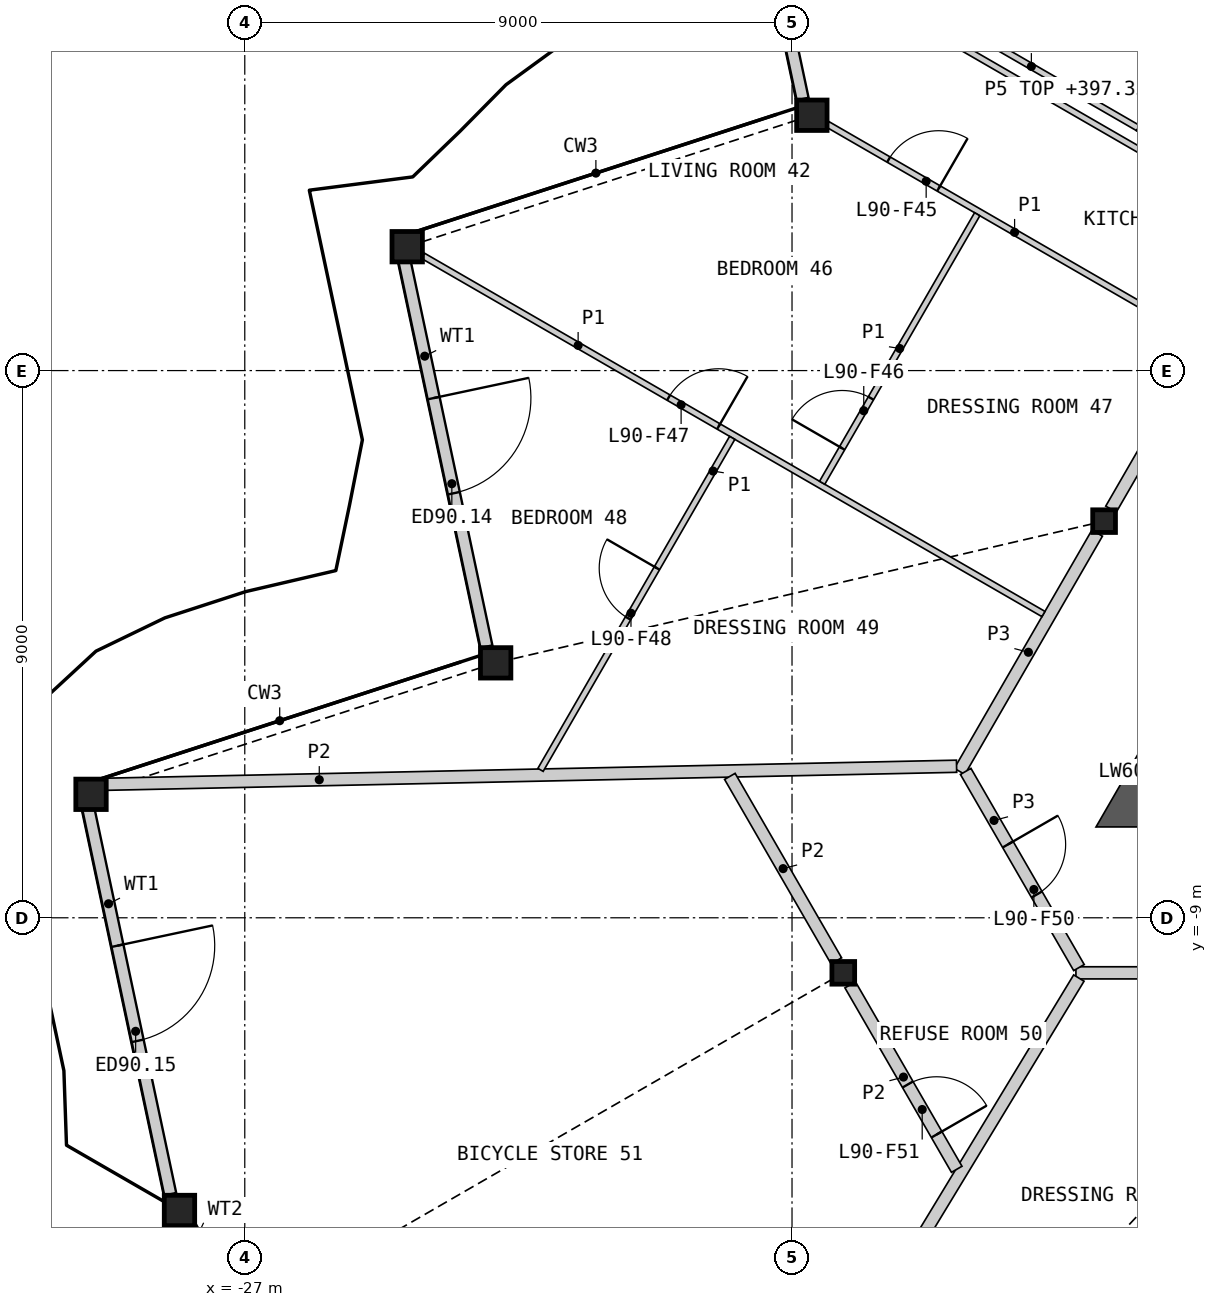
"""IFC4 building model, lengths in metres.
Left out: names, types, materials, properties, quantities, classifications, styles, units other than length and angle.
Written with IfcOpenShell. Run it as: python <this file> out.ifc"""

import sys

from ifc_helpers import new_model, si_unit, direction, frame, frame_2d, origin, origin_2d, place, context, subcontext, project, spatial, polyline, rectangle, hollow_rectangle, i_section, outline, extrude, element, fill, save


model = new_model("IFC4")
c1 = context("Model", 3, precision=1e-05, world=origin(), true_north=direction((0.0, 1.0)))
c2 = subcontext(c1, "Body", "Model", "MODEL_VIEW")
j1 = project(units=[si_unit("LENGTHUNIT", "METRE"), si_unit("PLANEANGLEUNIT", "RADIAN")], contexts=[c1])
p1 = place(None, origin())
s1 = spatial("IfcSite", under=j1, at=p1, CompositionType="ELEMENT")
p2 = place(p1, origin())
s2 = spatial("IfcBuilding", under=s1, at=p2, CompositionType="ELEMENT")
p3 = place(p2, frame((0.0, 0.0, 395.0)))
s3 = spatial("IfcBuildingStorey", under=s2, at=p3, CompositionType="ELEMENT", Elevation=395.0)
for number, where, z_axis, x_axis in (
    (1, (-17.674, 4.199, 0.0), (0.0, 0.0, 1.0), (1.0, 0.0, 0.0)),
    (2, (-24.329, 2.037, 0.0), (0.0, 0.0, 1.0), (1.0, 0.0, 0.0)),
    (3, (-22.874, -4.807, 0.0), (0.0, 0.0, 1.0), (1.0, 0.0, 0.0)),
    (4, (-29.529, -6.969, 0.0), (0.0, 0.0, 1.0), (1.0, 0.0, 0.0)),
    (5, (-28.074, -13.814, 0.0), (0.0, 0.0, 1.0), (1.0, 0.0, 0.0)),
):
    element("IfcColumn", number, at=place(p3, frame(where, z_axis=z_axis, x_axis=x_axis)), inside=s3, PredefinedType="COLUMN", context=c2, shape_type="SweptSolid", body=[
        extrude(hollow_rectangle(XDim=0.5, YDim=0.5, WallThickness=0.03, at=origin_2d()), origin(), (0.0, 0.0, 1.0), 3.4),
    ])
for number, where, z_axis, x_axis in (
    (6, (-12.868, -2.476, 0.0), (0.0, 0.0, 1.0), (1.0, 0.0, 0.0)),
    (7, (-17.157, -9.906, 0.0), (0.0, 0.0, 1.0), (1.0, 0.0, 0.0)),
):
    element("IfcColumn", number, at=place(p3, frame(where, z_axis=z_axis, x_axis=x_axis)), inside=s3, PredefinedType="COLUMN", context=c2, shape_type="SweptSolid", body=[
        extrude(i_section(OverallWidth=0.374, OverallDepth=0.372, WebThickness=0.016, FlangeThickness=0.026, at=origin_2d()), origin(), (0.0, 0.0, 1.0), 3.4),
    ])
p4 = place(p3, frame((-19.179, 10.836, 0.0), z_axis=(0.0, 0.0, 1.0), x_axis=(0.207910765171, -0.978147797486, 0.0)))
e8 = element("IfcWall", 8, at=p4, inside=s3, PredefinedType="SOLIDWALL", context=c2, shape_type="SweptSolid", body=[
    extrude(rectangle(XDim=6.512, YDim=0.2, at=frame_2d((3.256, 0.0))), origin(), (0.0, 0.0, 1.0), 2.634),
])
p5 = place(p4, frame((2.333, 0.0, 0.0)))
e9 = element("IfcOpeningElement", 9, at=p5, cuts=e8, PredefinedType="OPENING", context=c2, shape_type="SweptSolid", body=[
    extrude(rectangle(XDim=1.6, YDim=2.25, at=frame_2d((0.8, 1.125))), frame((0.0, 0.11, 0.0), z_axis=(0.0, -1.0, 0.0), x_axis=(1.0, 0.0, 0.0)), (0.0, 0.0, 1.0), 0.22),
])
p6 = place(p3, frame((-24.379, 1.83, 0.0), z_axis=(0.0, 0.0, 1.0), x_axis=(0.207910765171, -0.978147797486, 0.0)))
e10 = element("IfcWall", 10, at=p6, inside=s3, PredefinedType="SOLIDWALL", context=c2, shape_type="SweptSolid", body=[
    extrude(rectangle(XDim=6.512, YDim=0.2, at=frame_2d((3.256, 0.0))), origin(), (0.0, 0.0, 1.0), 2.634),
])
p7 = place(p6, frame((2.333, 0.0, 0.0)))
e11 = element("IfcOpeningElement", 11, at=p7, cuts=e10, PredefinedType="OPENING", context=c2, shape_type="SweptSolid", body=[
    extrude(rectangle(XDim=1.6, YDim=2.25, at=frame_2d((0.8, 1.125))), frame((0.0, 0.11, 0.0), z_axis=(0.0, -1.0, 0.0), x_axis=(1.0, 0.0, 0.0)), (0.0, 0.0, 1.0), 0.22),
])
p8 = place(p3, frame((-29.579, -7.177, 0.0), z_axis=(0.0, 0.0, 1.0), x_axis=(0.207910765171, -0.978147797486, 0.0)))
e12 = element("IfcWall", 12, at=p8, inside=s3, PredefinedType="SOLIDWALL", context=c2, shape_type="SweptSolid", body=[
    extrude(rectangle(XDim=6.512, YDim=0.2, at=frame_2d((3.256, 0.0))), origin(), (0.0, 0.0, 1.0), 2.634),
])
p9 = place(p8, frame((2.333, 0.0, 0.0)))
e13 = element("IfcOpeningElement", 13, at=p9, cuts=e12, PredefinedType="OPENING", context=c2, shape_type="SweptSolid", body=[
    extrude(rectangle(XDim=1.6, YDim=2.25, at=frame_2d((0.8, 1.125))), frame((0.0, 0.11, 0.0), z_axis=(0.0, -1.0, 0.0), x_axis=(1.0, 0.0, 0.0)), (0.0, 0.0, 1.0), 0.22),
])
p10 = place(p3, frame((-28.007, -13.939, 0.0), z_axis=(0.0, 0.0, 1.0), x_axis=(0.499967189098, -0.866044346339, 0.0)))
e14 = element("IfcWall", 14, at=p10, inside=s3, PredefinedType="SOLIDWALL", context=c2, shape_type="SweptSolid", body=[
    extrude(rectangle(XDim=1.612, YDim=0.25, at=frame_2d((0.806, 0.0))), origin(), (0.0, 0.0, 1.0), 2.634),
])
p11 = place(p10, frame((0.25, 0.0, 0.4)))
e15 = element("IfcOpeningElement", 15, at=p11, cuts=e14, PredefinedType="OPENING", context=c2, shape_type="SweptSolid", body=[
    extrude(rectangle(XDim=0.6, YDim=0.6, at=frame_2d((0.3, 0.3))), frame((0.0, 0.135, 0.0), z_axis=(0.0, -1.0, 0.0), x_axis=(1.0, 0.0, 0.0)), (0.0, 0.0, 1.0), 0.27),
])
p12 = place(p3, origin())
e16 = element("IfcWall", 16, at=p12, inside=s3, PredefinedType="SHEAR", context=c2, shape_type="SweptSolid", body=[
    extrude(outline(polyline([(-12.48, -6.606), (-11.961, -6.906), (-11.961, -7.506), (-13.0, -7.506), (-12.48, -6.606)])), origin(), (0.0, 0.0, 1.0), 3.1),
])
p13 = place(p3, frame((-10.925, -4.511, 0.0), z_axis=(0.0, 0.0, 1.0), x_axis=(-0.500018667571, -0.866014625789, 0.0)))
e17 = element("IfcWall", 17, at=p13, inside=s3, PredefinedType="SHEAR", context=c2, shape_type="SweptSolid", body=[
    extrude(rectangle(XDim=2.592, YDim=0.6, at=frame_2d((1.296, 0.0))), origin(), (0.0, 0.0, 1.0), 3.1),
])
p14 = place(p13, frame((0.6, 0.0, 0.0)))
e18 = element("IfcOpeningElement", 18, at=p14, cuts=e17, PredefinedType="OPENING", context=c2, shape_type="SweptSolid", body=[
    extrude(rectangle(XDim=1.0, YDim=2.1, at=frame_2d((0.5, 1.05))), frame((0.0, 0.31, 0.0), z_axis=(0.0, -1.0, 0.0), x_axis=(1.0, 0.0, 0.0)), (0.0, 0.0, 1.0), 0.62),
])
p15 = place(p3, frame((-12.754, -2.279, 0.0), z_axis=(0.0, 0.0, 1.0), x_axis=(0.500001682468, 0.866024432409, 0.0)))
e19 = element("IfcWall", 19, at=p15, inside=s3, PredefinedType="PARTITIONING", context=c2, shape_type="SweptSolid", body=[
    extrude(rectangle(XDim=8.124, YDim=0.2, at=frame_2d((4.062, 0.0))), origin(), (0.0, 0.0, 1.0), 3.1),
])
p16 = place(p15, frame((3.762, 0.0, 0.0)))
e20 = element("IfcOpeningElement", 20, at=p16, cuts=e19, PredefinedType="OPENING", context=c2, shape_type="SweptSolid", body=[
    extrude(rectangle(XDim=1.0, YDim=2.1, at=frame_2d((0.5, 1.05))), frame((0.0, 0.11, 0.0), z_axis=(0.0, -1.0, 0.0), x_axis=(1.0, 0.0, 0.0)), (0.0, 0.0, 1.0), 0.22),
])
p17 = place(p3, frame((-13.331, -9.906, 0.0), z_axis=(0.0, 0.0, 1.0), x_axis=(1.0, 0.0, 0.0)))
e21 = element("IfcWall", 21, at=p17, inside=s3, PredefinedType="PARTITIONING", context=c2, shape_type="SweptSolid", body=[
    extrude(rectangle(XDim=4.555, YDim=0.2, at=frame_2d((2.278, 0.0))), origin(), (0.0, 0.0, 1.0), 3.1),
])
p18 = place(p3, frame((-15.244, -6.592, 0.0), z_axis=(0.0, 0.0, 1.0), x_axis=(0.499974648164, 0.866040040179, 0.0)))
e22 = element("IfcWall", 22, at=p18, inside=s3, PredefinedType="PARTITIONING", context=c2, shape_type="SweptSolid", body=[
    extrude(rectangle(XDim=4.525, YDim=0.2, at=frame_2d((2.263, 0.0))), origin(), (0.0, 0.0, 1.0), 3.1),
])
p19 = place(p3, frame((-15.144, -6.592, 0.0), z_axis=(0.0, 0.0, 1.0), x_axis=(0.499958791762, -0.866049194065, 0.0)))
e23 = element("IfcWall", 23, at=p19, inside=s3, PredefinedType="PARTITIONING", context=c2, shape_type="SweptSolid", body=[
    extrude(rectangle(XDim=3.726, YDim=0.2, at=frame_2d((1.863, 0.0))), origin(), (0.0, 0.0, 1.0), 3.1),
])
p20 = place(p19, frame((1.388, 0.0, 0.0)))
e24 = element("IfcOpeningElement", 24, at=p20, cuts=e23, PredefinedType="OPENING", context=c2, shape_type="SweptSolid", body=[
    extrude(rectangle(XDim=0.95, YDim=2.1, at=frame_2d((0.475, 1.05))), frame((0.0, 0.11, 0.0), z_axis=(0.0, -1.0, 0.0), x_axis=(1.0, 0.0, 0.0)), (0.0, 0.0, 1.0), 0.22),
])
p21 = place(p3, frame((-20.354, -21.66, 0.0), z_axis=(0.0, 0.0, 1.0), x_axis=(0.518240642668, 0.85523484277, 0.0)))
e25 = element("IfcWall", 25, at=p21, inside=s3, PredefinedType="PARTITIONING", context=c2, shape_type="SweptSolid", body=[
    extrude(rectangle(XDim=13.644, YDim=0.2, at=frame_2d((6.822, 0.0))), origin(), (0.0, 0.0, 1.0), 2.33),
])
p22 = place(p3, frame((-29.269, -6.804, 0.0), z_axis=(0.0, 0.0, 1.0), x_axis=(0.999775536303, 0.021186717777, 0.0)))
e26 = element("IfcWall", 26, at=p22, inside=s3, PredefinedType="PARTITIONING", context=c2, shape_type="SweptSolid", body=[
    extrude(rectangle(XDim=13.978, YDim=0.2, at=frame_2d((6.989, 0.0))), origin(), (0.0, 0.0, 1.0), 2.33),
])
p23 = place(p3, frame((-17.043, -10.103, 0.0), z_axis=(0.0, 0.0, 1.0), x_axis=(0.500005931509, -0.866021979199, 0.0)))
e27 = element("IfcWall", 27, at=p23, inside=s3, PredefinedType="PARTITIONING", context=c2, shape_type="SweptSolid", body=[
    extrude(rectangle(XDim=3.504, YDim=0.2, at=frame_2d((1.752, 0.0))), origin(), (0.0, 0.0, 1.0), 2.33),
])
p24 = place(p23, frame((1.893, 0.0, 0.0)))
e28 = element("IfcOpeningElement", 28, at=p24, cuts=e27, PredefinedType="OPENING", context=c2, shape_type="SweptSolid", body=[
    extrude(rectangle(XDim=0.95, YDim=2.1, at=frame_2d((0.475, 1.05))), frame((0.0, 0.11, 0.0), z_axis=(0.0, -1.0, 0.0), x_axis=(1.0, 0.0, 0.0)), (0.0, 0.0, 1.0), 0.22),
])
p25 = place(p3, frame((-19.022, -6.674, 0.0), z_axis=(0.0, 0.0, 1.0), x_axis=(0.499983843005, -0.866034731829, 0.0)))
e29 = element("IfcWall", 29, at=p25, inside=s3, PredefinedType="PARTITIONING", context=c2, shape_type="SweptSolid", body=[
    extrude(rectangle(XDim=3.503, YDim=0.2, at=frame_2d((1.752, 0.0))), origin(), (0.0, 0.0, 1.0), 2.33),
])
p26 = place(p3, frame((-24.069, 1.887, 0.0), z_axis=(0.0, 0.0, 1.0), x_axis=(0.866023404247, -0.500003463284, 0.0)))
e30 = element("IfcWall", 30, at=p26, inside=s3, PredefinedType="PARTITIONING", context=c2, shape_type="SweptSolid", body=[
    extrude(rectangle(XDim=11.782, YDim=0.1, at=frame_2d((5.891, 0.0))), origin(), (0.0, 0.0, 1.0), 2.33),
])
p27 = place(p26, frame((4.664, 0.0, 0.0)))
e31 = element("IfcOpeningElement", 31, at=p27, cuts=e30, PredefinedType="OPENING", context=c2, shape_type="SweptSolid", body=[
    extrude(rectangle(XDim=0.95, YDim=2.1, at=frame_2d((0.475, 1.05))), frame((0.0, 0.06, 0.0), z_axis=(0.0, -1.0, 0.0), x_axis=(1.0, 0.0, 0.0)), (0.0, 0.0, 1.0), 0.12),
])
p28 = place(p3, frame((-17.414, 4.049, 0.0), z_axis=(0.0, 0.0, 1.0), x_axis=(0.866033839264, -0.499985389037, 0.0)))
e32 = element("IfcWall", 32, at=p28, inside=s3, PredefinedType="PARTITIONING", context=c2, shape_type="SweptSolid", body=[
    extrude(rectangle(XDim=7.1, YDim=0.1, at=frame_2d((3.55, 0.0))), origin(), (0.0, 0.0, 1.0), 2.33),
])
p29 = place(p28, frame((1.158, 0.0, 0.0)))
e33 = element("IfcOpeningElement", 33, at=p29, cuts=e32, PredefinedType="OPENING", context=c2, shape_type="SweptSolid", body=[
    extrude(rectangle(XDim=0.95, YDim=2.1, at=frame_2d((0.475, 1.05))), frame((0.0, 0.06, 0.0), z_axis=(0.0, -1.0, 0.0), x_axis=(1.0, 0.0, 0.0)), (0.0, 0.0, 1.0), 0.12),
])
p30 = place(p3, frame((-22.136, -6.567, 0.0), z_axis=(0.0, 0.0, 1.0), x_axis=(0.500016298831, 0.866015993445, 0.0)))
e34 = element("IfcWall", 34, at=p30, inside=s3, PredefinedType="PARTITIONING", context=c2, shape_type="SweptSolid", body=[
    extrude(rectangle(XDim=6.305, YDim=0.1, at=frame_2d((3.152, 0.0))), origin(), (0.0, 0.0, 1.0), 2.33),
])
p31 = place(p30, frame((2.88, 0.0, 0.0)))
e35 = element("IfcOpeningElement", 35, at=p31, cuts=e34, PredefinedType="OPENING", context=c2, shape_type="SweptSolid", body=[
    extrude(rectangle(XDim=0.95, YDim=2.1, at=frame_2d((0.475, 1.05))), frame((0.0, 0.06, 0.0), z_axis=(0.0, -1.0, 0.0), x_axis=(1.0, 0.0, 0.0)), (0.0, 0.0, 1.0), 0.12),
])
p32 = place(p3, frame((-15.318, 5.38, 0.0), z_axis=(0.0, 0.0, 1.0), x_axis=(0.866035260786, -0.499982926783, 0.0)))
e36 = element("IfcWall", 36, at=p32, inside=s3, PredefinedType="PARTITIONING", context=c2, shape_type="SweptSolid", body=[
    extrude(rectangle(XDim=5.95, YDim=0.1, at=frame_2d((2.975, 0.0))), origin(), (0.0, 0.0, 1.0), 2.33),
])
p33 = place(p3, frame((-12.292, 3.921, 0.0), z_axis=(0.0, 0.0, 1.0), x_axis=(0.499996545922, 0.866027397988, 0.0)))
e37 = element("IfcWall", 37, at=p33, inside=s3, PredefinedType="PARTITIONING", context=c2, shape_type="SweptSolid", body=[
    extrude(rectangle(XDim=5.5, YDim=0.1, at=frame_2d((2.75, 0.0))), origin(), (0.0, 0.0, 1.0), 2.33),
])
p34 = place(p33, frame((4.3, 0.0, 0.0)))
e38 = element("IfcOpeningElement", 38, at=p34, cuts=e37, PredefinedType="OPENING", context=c2, shape_type="SweptSolid", body=[
    extrude(rectangle(XDim=0.95, YDim=2.1, at=frame_2d((0.475, 1.05))), frame((0.0, 0.06, 0.0), z_axis=(0.0, -1.0, 0.0), x_axis=(1.0, 0.0, 0.0)), (0.0, 0.0, 1.0), 0.12),
])
p35 = place(p33, frame((1.465, 0.0, 0.0)))
e39 = element("IfcOpeningElement", 39, at=p35, cuts=e37, PredefinedType="OPENING", context=c2, shape_type="SweptSolid", body=[
    extrude(rectangle(XDim=0.95, YDim=2.1, at=frame_2d((0.475, 1.05))), frame((0.0, 0.06, 0.0), z_axis=(0.0, -1.0, 0.0), x_axis=(1.0, 0.0, 0.0)), (0.0, 0.0, 1.0), 0.12),
])
p36 = place(p3, frame((-17.504, -1.845, 0.0), z_axis=(0.0, 0.0, 1.0), x_axis=(0.499984882974, 0.866034131428, 0.0)))
e40 = element("IfcWall", 40, at=p36, inside=s3, PredefinedType="PARTITIONING", context=c2, shape_type="SweptSolid", body=[
    extrude(rectangle(XDim=5.1, YDim=0.1, at=frame_2d((2.55, 0.0))), origin(), (0.0, 0.0, 1.0), 2.33),
])
p37 = place(p36, frame((0.656, 0.0, 0.0)))
e41 = element("IfcOpeningElement", 41, at=p37, cuts=e40, PredefinedType="OPENING", context=c2, shape_type="SweptSolid", body=[
    extrude(rectangle(XDim=0.95, YDim=2.1, at=frame_2d((0.475, 1.05))), frame((0.0, 0.06, 0.0), z_axis=(0.0, -1.0, 0.0), x_axis=(1.0, 0.0, 0.0)), (0.0, 0.0, 1.0), 0.12),
])
p38 = place(p3, frame((-14.648, 5.34, 0.0), z_axis=(0.0, 0.0, 1.0), x_axis=(0.86599734893, -0.500048589285, 0.0)))
e42 = element("IfcWall", 42, at=p38, inside=s3, PredefinedType="PARTITIONING", context=c2, shape_type="SweptSolid", body=[
    extrude(rectangle(XDim=2.7, YDim=0.1, at=frame_2d((1.35, 0.0))), origin(), (0.0, 0.0, 1.0), 2.33),
])
p39 = place(p7, origin())
e43 = element("IfcDoor", 43, at=p39, inside=s3, OperationType="DOUBLE_DOOR_SINGLE_SWING", PredefinedType="DOOR", context=c2, shape_type="SweptSolid", body=[
    extrude(rectangle(XDim=1.6, YDim=2.25, at=frame_2d((0.8, 1.125))), frame((0.0, 0.025, 0.0), z_axis=(0.0, -1.0, 0.0), x_axis=(1.0, 0.0, 0.0)), (0.0, 0.0, 1.0), 0.05),
])
fill(e11, e43)
p40 = place(p9, origin())
e44 = element("IfcDoor", 44, at=p40, inside=s3, OperationType="DOUBLE_DOOR_SINGLE_SWING", PredefinedType="DOOR", context=c2, shape_type="SweptSolid", body=[
    extrude(rectangle(XDim=1.6, YDim=2.25, at=frame_2d((0.8, 1.125))), frame((0.0, 0.025, 0.0), z_axis=(0.0, -1.0, 0.0), x_axis=(1.0, 0.0, 0.0)), (0.0, 0.0, 1.0), 0.05),
])
fill(e13, e44)
p41 = place(p29, origin())
e45 = element("IfcDoor", 45, at=p41, inside=s3, OperationType="SINGLE_SWING_RIGHT", PredefinedType="DOOR", context=c2, shape_type="SweptSolid", body=[
    extrude(rectangle(XDim=0.95, YDim=2.1, at=frame_2d((0.475, 1.05))), frame((0.0, 0.025, 0.0), z_axis=(0.0, -1.0, 0.0), x_axis=(1.0, 0.0, 0.0)), (0.0, 0.0, 1.0), 0.05),
])
fill(e33, e45)
p42 = place(p37, origin())
e46 = element("IfcDoor", 46, at=p42, inside=s3, OperationType="SINGLE_SWING_LEFT", PredefinedType="DOOR", context=c2, shape_type="SweptSolid", body=[
    extrude(rectangle(XDim=0.95, YDim=2.1, at=frame_2d((0.475, 1.05))), frame((0.0, 0.025, 0.0), z_axis=(0.0, -1.0, 0.0), x_axis=(1.0, 0.0, 0.0)), (0.0, 0.0, 1.0), 0.05),
])
fill(e41, e46)
p43 = place(p27, origin())
e47 = element("IfcDoor", 47, at=p43, inside=s3, OperationType="SINGLE_SWING_RIGHT", PredefinedType="DOOR", context=c2, shape_type="SweptSolid", body=[
    extrude(rectangle(XDim=0.95, YDim=2.1, at=frame_2d((0.475, 1.05))), frame((0.0, 0.025, 0.0), z_axis=(0.0, -1.0, 0.0), x_axis=(1.0, 0.0, 0.0)), (0.0, 0.0, 1.0), 0.05),
])
fill(e31, e47)
p44 = place(p31, origin())
e48 = element("IfcDoor", 48, at=p44, inside=s3, OperationType="SINGLE_SWING_RIGHT", PredefinedType="DOOR", context=c2, shape_type="SweptSolid", body=[
    extrude(rectangle(XDim=0.95, YDim=2.1, at=frame_2d((0.475, 1.05))), frame((0.0, 0.025, 0.0), z_axis=(0.0, -1.0, 0.0), x_axis=(1.0, 0.0, 0.0)), (0.0, 0.0, 1.0), 0.05),
])
fill(e35, e48)
p45 = place(p20, origin())
e49 = element("IfcDoor", 49, at=p45, inside=s3, OperationType="SINGLE_SWING_LEFT", PredefinedType="DOOR", context=c2, shape_type="SweptSolid", body=[
    extrude(rectangle(XDim=0.95, YDim=2.1, at=frame_2d((0.475, 1.05))), frame((0.0, 0.025, 0.0), z_axis=(0.0, -1.0, 0.0), x_axis=(1.0, 0.0, 0.0)), (0.0, 0.0, 1.0), 0.05),
])
fill(e24, e49)
p46 = place(p24, origin())
e50 = element("IfcDoor", 50, at=p46, inside=s3, OperationType="SINGLE_SWING_RIGHT", PredefinedType="DOOR", context=c2, shape_type="SweptSolid", body=[
    extrude(rectangle(XDim=0.95, YDim=2.1, at=frame_2d((0.475, 1.05))), frame((0.0, 0.025, 0.0), z_axis=(0.0, -1.0, 0.0), x_axis=(1.0, 0.0, 0.0)), (0.0, 0.0, 1.0), 0.05),
])
fill(e28, e50)
save(model, sys.argv[1])
